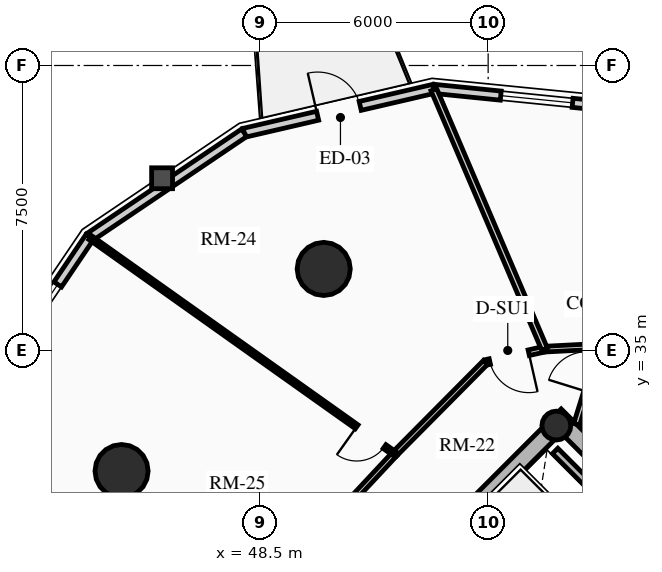
"""IFC4 building model, lengths in metres.
Left out: names, types, materials, properties, quantities, classifications, styles, units other than length and angle.
Written with IfcOpenShell. Run it as: python <this file> out.ifc"""

import sys

from ifc_helpers import new_model, si_unit, direction, frame, frame_2d, origin, origin_2d, place, context, subcontext, project, spatial, rectangle, circle, hollow_circle, extrude, source, transform, mapped, element, fill, save


model = new_model("IFC4")
c1 = context("Model", 3, precision=1e-05, world=origin(), true_north=direction((0.0, 1.0)))
c2 = subcontext(c1, "Body", "Model", "MODEL_VIEW")
j1 = project(units=[si_unit("LENGTHUNIT", "METRE"), si_unit("PLANEANGLEUNIT", "RADIAN")], contexts=[c1])
p1 = place(None, origin())
s1 = spatial("IfcSite", under=j1, at=p1, CompositionType="ELEMENT")
p2 = place(p1, origin())
s2 = spatial("IfcBuilding", under=s1, at=p2, CompositionType="ELEMENT")
p3 = place(p2, frame((0.0, 0.0, 113.8)))
s3 = spatial("IfcBuildingStorey", under=s2, at=p3, CompositionType="ELEMENT", Elevation=113.8)
p4 = place(p3, frame((66.303, 23.263, 0.0), z_axis=(0.0, 0.0, 1.0), x_axis=(-0.707106781187, 0.707106781187, 0.0)))
e1 = element("IfcWall", 1, at=p4, inside=s3, PredefinedType="SHEAR", context=c2, shape_type="SweptSolid", body=[
    extrude(rectangle(XDim=14.2, YDim=0.45, at=frame_2d((7.1, 0.0))), origin(), (0.0, 0.0, 1.0), 2.91),
])
p5 = place(p3, frame((48.856, 25.578, 0.0), z_axis=(0.0, 0.0, 1.0), x_axis=(0.707106781187, 0.707106781187, 0.0)))
e2 = element("IfcWall", 2, at=p5, inside=s3, PredefinedType="SHEAR", context=c2, shape_type="SweptSolid", body=[
    extrude(rectangle(XDim=10.7, YDim=0.45, at=frame_2d((5.35, 0.0))), origin(), (0.0, 0.0, 1.0), 2.91),
])
m1 = source(origin(), c2, "Body", "SweptSolid", [
    extrude(rectangle(XDim=1.5, YDim=2.02, at=frame_2d((0.75, 1.01))), frame((0.0, 0.235, 0.0), z_axis=(0.0, -1.0, 0.0), x_axis=(1.0, 0.0, 0.0)), (0.0, 0.0, 1.0), 0.47),
])
p6 = place(p5, frame((4.6, 0.0, 0.0)))
e3 = element("IfcOpeningElement", 3, at=p6, cuts=e2, PredefinedType="OPENING", context=c2, shape_type="MappedRepresentation", body=[
    mapped(m1, transform((0.0, 0.0, 0.0), x_axis=(1.0, 0.0, 0.0), y_axis=(0.0, 1.0, 0.0), z_axis=(0.0, 0.0, 1.0), scale=1.0)),
])
p7 = place(p3, frame((56.294, 33.024, 0.0), z_axis=(0.0, 0.0, 1.0), x_axis=(0.707106781187, 0.707106781187, 0.0)))
e4 = element("IfcColumn", 4, at=p7, inside=s3, PredefinedType="COLUMN", context=c2, shape_type="SweptSolid", body=[
    extrude(hollow_circle(Radius=0.38, WallThickness=0.032, at=origin_2d()), origin(), (0.0, 0.0, 1.0), 2.91),
])
for number, where, z_axis, x_axis in (
    (5, (50.173, 37.146, 0.0), (0.0, 0.0, 1.0), (1.0, 0.0, 0.0)),
    (6, (44.854, 31.827, 0.0), (0.0, 0.0, 1.0), (1.0, 0.0, 0.0)),
):
    element("IfcColumn", number, at=place(p3, frame(where, z_axis=z_axis, x_axis=x_axis)), inside=s3, PredefinedType="USERDEFINED", context=c2, shape_type="SweptSolid", body=[
        extrude(circle(Radius=0.7, at=origin_2d()), origin(), (0.0, 0.0, 1.0), 2.91),
    ])
p8 = place(p3, frame((53.067, 41.885, 0.0), z_axis=(0.0, 0.0, 1.0), x_axis=(0.994971754311, -0.10015591906, 0.0)))
e7 = element("IfcWall", 7, at=p8, inside=s3, PredefinedType="SOLIDWALL", context=c2, shape_type="SweptSolid", body=[
    extrude(rectangle(XDim=5.448, YDim=0.24, at=frame_2d((2.724, 0.0))), origin(), (0.0, 0.0, 1.0), 2.179),
])
m2 = source(origin(), c2, "Body", "SweptSolid", [
    extrude(rectangle(XDim=1.9, YDim=1.35, at=frame_2d((0.95, 0.675))), frame((0.0, 0.13, 0.0), z_axis=(0.0, -1.0, 0.0), x_axis=(1.0, 0.0, 0.0)), (0.0, 0.0, 1.0), 0.26),
])
p9 = place(p8, frame((1.774, 0.0, 0.65)))
e8 = element("IfcOpeningElement", 8, at=p9, cuts=e7, PredefinedType="OPENING", context=c2, shape_type="MappedRepresentation", body=[
    mapped(m2, transform((0.0, 0.0, 0.0), x_axis=(1.0, 0.0, 0.0), y_axis=(0.0, 1.0, 0.0), z_axis=(0.0, 0.0, 1.0), scale=1.0)),
])
p10 = place(p3, frame((48.08, 40.729, 0.0), z_axis=(0.0, 0.0, 1.0), x_axis=(0.974165631126, 0.225834725257, 0.0)))
e9 = element("IfcWall", 9, at=p10, inside=s3, PredefinedType="SOLIDWALL", context=c2, shape_type="SweptSolid", body=[
    extrude(rectangle(XDim=5.119, YDim=0.24, at=frame_2d((2.56, 0.0))), origin(), (0.0, 0.0, 1.0), 2.179),
])
m3 = source(origin(), c2, "Body", "SweptSolid", [
    extrude(rectangle(XDim=1.15, YDim=2.005, at=frame_2d((0.575, 1.002))), frame((0.0, 0.13, 0.0), z_axis=(0.0, -1.0, 0.0), x_axis=(1.0, 0.0, 0.0)), (0.0, 0.0, 1.0), 0.26),
])
p11 = place(p10, frame((1.984, 0.0, 0.0)))
e10 = element("IfcOpeningElement", 10, at=p11, cuts=e9, PredefinedType="OPENING", context=c2, shape_type="MappedRepresentation", body=[
    mapped(m3, transform((0.0, 0.0, 0.0), x_axis=(1.0, 0.0, 0.0), y_axis=(0.0, 1.0, 0.0), z_axis=(0.0, 0.0, 1.0), scale=1.0)),
])
p12 = place(p3, frame((44.015, 37.985, 0.0), z_axis=(0.0, 0.0, 1.0), x_axis=(0.828781148131, 0.559572880421, 0.0)))
e11 = element("IfcWall", 11, at=p12, inside=s3, PredefinedType="SOLIDWALL", context=c2, shape_type="SweptSolid", body=[
    extrude(rectangle(XDim=4.905, YDim=0.24, at=frame_2d((2.452, 0.0))), origin(), (0.0, 0.0, 1.0), 2.179),
])
p13 = place(p3, frame((41.271, 33.92, 0.0), z_axis=(0.0, 0.0, 1.0), x_axis=(0.559572880421, 0.828781148131, 0.0)))
e12 = element("IfcWall", 12, at=p13, inside=s3, PredefinedType="SOLIDWALL", context=c2, shape_type="SweptSolid", body=[
    extrude(rectangle(XDim=4.905, YDim=0.24, at=frame_2d((2.452, 0.0))), origin(), (0.0, 0.0, 1.0), 2.179),
])
p14 = place(p13, frame((1.502, 0.0, 0.65)))
e13 = element("IfcOpeningElement", 13, at=p14, cuts=e12, PredefinedType="OPENING", context=c2, shape_type="MappedRepresentation", body=[
    mapped(m2, transform((0.0, 0.0, 0.0), x_axis=(1.0, 0.0, 0.0), y_axis=(0.0, 1.0, 0.0), z_axis=(0.0, 0.0, 1.0), scale=1.0)),
])
p15 = place(p3, frame((55.615, 29.227, 0.0), z_axis=(0.0, 0.0, 1.0), x_axis=(0.707147878904, 0.70706568108, 0.0)))
e14 = element("IfcWall", 14, at=p15, inside=s3, PredefinedType="SHEAR", context=c2, shape_type="SweptSolid", body=[
    extrude(rectangle(XDim=2.97, YDim=0.2, at=frame_2d((1.485, 0.0))), origin(), (0.0, 0.0, 1.0), 2.91),
])
p16 = place(p3, frame((57.419, 31.2, 0.0), z_axis=(0.0, 0.0, 1.0), x_axis=(-0.707032117043, 0.707181437447, 0.0)))
e15 = element("IfcWall", 15, at=p16, inside=s3, PredefinedType="SHEAR", context=c2, shape_type="SweptSolid", body=[
    extrude(rectangle(XDim=1.635, YDim=0.2, at=frame_2d((0.817, 0.0))), origin(), (0.0, 0.0, 1.0), 2.91),
])
p17 = place(p3, frame((57.467, 35.111, 0.0), z_axis=(0.0, 0.0, 1.0), x_axis=(-0.998691757323, -0.051134859488, 0.0)))
e16 = element("IfcWall", 16, at=p17, inside=s3, PredefinedType="PARTITIONING", context=c2, shape_type="SweptSolid", body=[
    extrude(rectangle(XDim=1.485, YDim=0.15, at=frame_2d((0.742, 0.0))), origin(), (0.0, 0.0, 1.0), 2.225),
])
p18 = place(p3, frame((55.984, 35.035, 0.0), z_axis=(0.0, 0.0, 1.0), x_axis=(-0.975290305708, -0.22092718165, 0.0)))
e17 = element("IfcWall", 17, at=p18, inside=s3, PredefinedType="PARTITIONING", context=c2, shape_type="SweptSolid", body=[
    extrude(rectangle(XDim=1.597, YDim=0.15, at=frame_2d((0.798, 0.0))), origin(), (0.0, 0.0, 1.0), 2.225),
])
m4 = source(origin(), c2, "Body", "SweptSolid", [
    extrude(rectangle(XDim=1.05, YDim=2.015, at=frame_2d((0.525, 1.007))), frame((0.0, 0.085, 0.0), z_axis=(0.0, -1.0, 0.0), x_axis=(1.0, 0.0, 0.0)), (0.0, 0.0, 1.0), 0.17),
])
p19 = place(p18, frame((0.427, 0.0, 0.0)))
e18 = element("IfcOpeningElement", 18, at=p19, cuts=e17, PredefinedType="OPENING", context=c2, shape_type="MappedRepresentation", body=[
    mapped(m4, transform((0.0, 0.0, 0.0), x_axis=(1.0, 0.0, 0.0), y_axis=(0.0, 1.0, 0.0), z_axis=(0.0, 0.0, 1.0), scale=1.0)),
])
p20 = place(p3, frame((54.427, 34.683, 0.0), z_axis=(0.0, 0.0, 1.0), x_axis=(-0.704178989986, -0.710022499687, 0.0)))
e19 = element("IfcWall", 19, at=p20, inside=s3, PredefinedType="PARTITIONING", context=c2, shape_type="SweptSolid", body=[
    extrude(rectangle(XDim=3.384, YDim=0.15, at=frame_2d((1.692, 0.0))), origin(), (0.0, 0.0, 1.0), 2.225),
])
p21 = place(p3, frame((52.043, 32.28, 0.0), z_axis=(0.0, 0.0, 1.0), x_axis=(-0.682606081633, -0.730786519661, 0.0)))
e20 = element("IfcWall", 20, at=p21, inside=s3, PredefinedType="PARTITIONING", context=c2, shape_type="SweptSolid", body=[
    extrude(rectangle(XDim=6.527, YDim=0.15, at=frame_2d((3.263, 0.0))), origin(), (0.0, 0.0, 1.0), 2.225),
])
p22 = place(p3, frame((55.984, 35.035, 0.0), z_axis=(0.0, 0.0, 1.0), x_axis=(-0.392438685048, 0.919778168081, 0.0)))
e21 = element("IfcWall", 21, at=p22, inside=s3, PredefinedType="PARTITIONING", context=c2, shape_type="SweptSolid", body=[
    extrude(rectangle(XDim=7.426, YDim=0.16, at=frame_2d((3.713, 0.0))), origin(), (0.0, 0.0, 1.0), 2.179),
])
p23 = place(p3, frame((56.828, 33.056, 0.0), z_axis=(0.0, 0.0, 1.0), x_axis=(0.296730996083, 0.954961107042, 0.0)))
e22 = element("IfcWall", 22, at=p23, inside=s3, PredefinedType="PARTITIONING", context=c2, shape_type="SweptSolid", body=[
    extrude(rectangle(XDim=2.152, YDim=0.16, at=frame_2d((1.076, 0.0))), origin(), (0.0, 0.0, 1.0), 2.225),
])
m5 = source(origin(), c2, "Body", "SweptSolid", [
    extrude(rectangle(XDim=1.05, YDim=2.015, at=frame_2d((0.525, 1.007))), frame((0.0, 0.09, 0.0), z_axis=(0.0, -1.0, 0.0), x_axis=(1.0, 0.0, 0.0)), (0.0, 0.0, 1.0), 0.18),
])
p24 = place(p23, frame((0.902, 0.0, 0.0)))
e23 = element("IfcOpeningElement", 23, at=p24, cuts=e22, PredefinedType="OPENING", context=c2, shape_type="MappedRepresentation", body=[
    mapped(m5, transform((0.0, 0.0, 0.0), x_axis=(1.0, 0.0, 0.0), y_axis=(0.0, 1.0, 0.0), z_axis=(0.0, 0.0, 1.0), scale=1.0)),
])
p25 = place(p3, frame((52.043, 32.28, 0.0), z_axis=(0.0, 0.0, 1.0), x_axis=(-0.81534487613, 0.578975589268, 0.0)))
e24 = element("IfcWall", 24, at=p25, inside=s3, PredefinedType="PARTITIONING", context=c2, shape_type="SweptSolid", body=[
    extrude(rectangle(XDim=9.829, YDim=0.125, at=frame_2d((4.915, 0.0))), origin(), (0.0, 0.0, 1.0), 2.179),
])
m6 = source(origin(), c2, "Body", "SweptSolid", [
    extrude(rectangle(XDim=0.9, YDim=2.005, at=frame_2d((0.45, 1.002))), frame((0.0, 0.073, 0.0), z_axis=(0.0, -1.0, 0.0), x_axis=(1.0, 0.0, 0.0)), (0.0, 0.0, 1.0), 0.145),
])
p26 = place(p25, frame((0.33, 0.0, 0.0)))
e25 = element("IfcOpeningElement", 25, at=p26, cuts=e24, PredefinedType="OPENING", context=c2, shape_type="MappedRepresentation", body=[
    mapped(m6, transform((0.0, 0.0, 0.0), x_axis=(1.0, 0.0, 0.0), y_axis=(0.0, 1.0, 0.0), z_axis=(0.0, 0.0, 1.0), scale=1.0)),
])
m7 = source(origin(), c2, "Body", "SweptSolid", [
    extrude(rectangle(XDim=1.9, YDim=1.35, at=frame_2d((0.95, 0.675))), frame((0.0, 0.03, 0.0), z_axis=(0.0, -1.0, 0.0), x_axis=(1.0, 0.0, 0.0)), (0.0, 0.0, 1.0), 0.06),
])
p27 = place(p9, origin())
e26 = element("IfcWindow", 26, at=p27, inside=s3, PartitioningType="DOUBLE_PANEL_VERTICAL", PredefinedType="WINDOW", context=c2, shape_type="MappedRepresentation", body=[
    mapped(m7, transform((0.0, 0.0, 0.0), x_axis=(1.0, 0.0, 0.0), y_axis=(0.0, 1.0, 0.0), z_axis=(0.0, 0.0, 1.0), scale=1.0)),
])
fill(e8, e26)
m8 = source(origin(), c2, "Body", "SweptSolid", [
    extrude(rectangle(XDim=1.15, YDim=2.005, at=frame_2d((0.575, 1.002))), frame((0.0, 0.025, 0.0), z_axis=(0.0, -1.0, 0.0), x_axis=(1.0, 0.0, 0.0)), (0.0, 0.0, 1.0), 0.05),
])
p28 = place(p11, origin())
e27 = element("IfcDoor", 27, at=p28, inside=s3, OperationType="SINGLE_SWING_LEFT", PredefinedType="DOOR", context=c2, shape_type="MappedRepresentation", body=[
    mapped(m8, transform((0.0, 0.0, 0.0), x_axis=(1.0, 0.0, 0.0), y_axis=(0.0, 1.0, 0.0), z_axis=(0.0, 0.0, 1.0), scale=1.0)),
])
fill(e10, e27)
p29 = place(p14, origin())
e28 = element("IfcWindow", 28, at=p29, inside=s3, PartitioningType="DOUBLE_PANEL_VERTICAL", PredefinedType="WINDOW", context=c2, shape_type="MappedRepresentation", body=[
    mapped(m7, transform((0.0, 0.0, 0.0), x_axis=(1.0, 0.0, 0.0), y_axis=(0.0, 1.0, 0.0), z_axis=(0.0, 0.0, 1.0), scale=1.0)),
])
fill(e13, e28)
m9 = source(origin(), c2, "Body", "SweptSolid", [
    extrude(rectangle(XDim=1.05, YDim=2.015, at=frame_2d((0.525, 1.007))), frame((0.0, 0.025, 0.0), z_axis=(0.0, -1.0, 0.0), x_axis=(1.0, 0.0, 0.0)), (0.0, 0.0, 1.0), 0.05),
])
p30 = place(p19, origin())
e29 = element("IfcDoor", 29, at=p30, inside=s3, OperationType="SINGLE_SWING_LEFT", PredefinedType="DOOR", context=c2, shape_type="MappedRepresentation", body=[
    mapped(m9, transform((0.0, 0.0, 0.0), x_axis=(1.0, 0.0, 0.0), y_axis=(0.0, 1.0, 0.0), z_axis=(0.0, 0.0, 1.0), scale=1.0)),
])
fill(e18, e29)
m10 = source(origin(), c2, "Body", "SweptSolid", [
    extrude(rectangle(XDim=0.9, YDim=2.005, at=frame_2d((0.45, 1.002))), frame((0.0, 0.025, 0.0), z_axis=(0.0, -1.0, 0.0), x_axis=(1.0, 0.0, 0.0)), (0.0, 0.0, 1.0), 0.05),
])
p31 = place(p26, origin())
e30 = element("IfcDoor", 30, at=p31, inside=s3, OperationType="SINGLE_SWING_RIGHT", PredefinedType="DOOR", context=c2, shape_type="MappedRepresentation", body=[
    mapped(m10, transform((0.0, 0.0, 0.0), x_axis=(1.0, 0.0, 0.0), y_axis=(0.0, 1.0, 0.0), z_axis=(0.0, 0.0, 1.0), scale=1.0)),
])
fill(e25, e30)
save(model, sys.argv[1])
